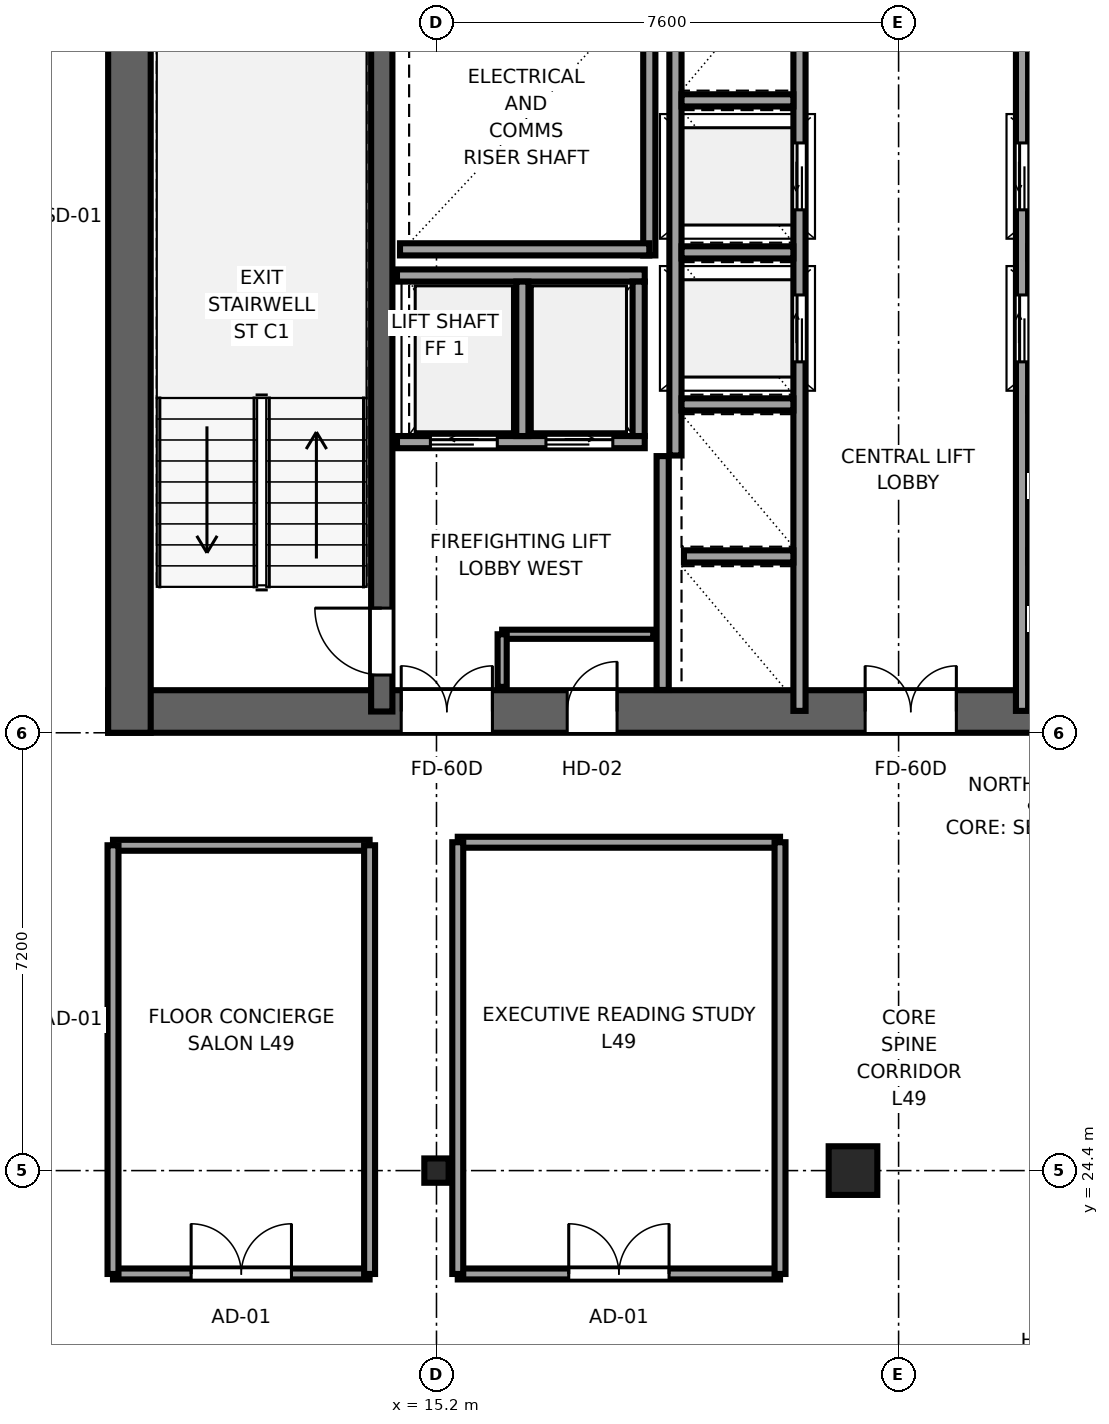
"""IFC4 building model, lengths in metres.
Left out: names, types, materials, properties, quantities, classifications, styles, units other than length and angle.
Written with IfcOpenShell. Run it as: python <this file> out.ifc"""

import sys

from ifc_helpers import new_model, si_unit, direction, frame, frame_2d, origin, origin_2d, place, context, subcontext, project, spatial, rectangle, i_section, extrude, source, transform, mapped, element, fill, save


model = new_model("IFC4")
c1 = context("Model", 3, precision=1e-05, world=origin(), true_north=direction((0.0, 1.0)))
c2 = subcontext(c1, "Body", "Model", "MODEL_VIEW")
j1 = project(units=[si_unit("LENGTHUNIT", "METRE"), si_unit("PLANEANGLEUNIT", "RADIAN")], contexts=[c1])
p1 = place(None, origin())
s1 = spatial("IfcSite", under=j1, at=p1, CompositionType="ELEMENT")
p2 = place(p1, origin())
s2 = spatial("IfcBuilding", under=s1, at=p2, CompositionType="ELEMENT")
p3 = place(p2, frame((0.0, 0.0, 187.55)))
s3 = spatial("IfcBuildingStorey", under=s2, at=p3, CompositionType="ELEMENT", Elevation=187.55)
p4 = place(p3, frame((9.8, 31.95, 0.0), z_axis=(0.0, 0.0, 1.0), x_axis=(1.0, 0.0, 0.0)))
e1 = element("IfcWall", 1, at=p4, inside=s3, PredefinedType="SHEAR", context=c2, shape_type="SweptSolid", body=[
    extrude(rectangle(XDim=26.4, YDim=0.7, at=frame_2d((13.2, 0.0))), origin(), (0.0, 0.0, 1.0), 3.55),
])
p5 = place(p4, frame((6.32, 0.0, 0.0), z_axis=(0.0, 0.0, 1.0), x_axis=(-1.0, 0.0, 0.0)))
e2 = element("IfcOpeningElement", 2, at=p5, cuts=e1, PredefinedType="OPENING", context=c2, shape_type="SweptSolid", body=[
    extrude(rectangle(XDim=1.5, YDim=2.04, at=frame_2d((0.75, 1.02))), frame((0.0, 0.36, 0.0), z_axis=(0.0, -1.0, 0.0), x_axis=(1.0, 0.0, 0.0)), (0.0, 0.0, 1.0), 0.72),
])
p6 = place(p4, frame((13.95, 0.0, 0.0), z_axis=(0.0, 0.0, 1.0), x_axis=(-1.0, 0.0, 0.0)))
e3 = element("IfcOpeningElement", 3, at=p6, cuts=e1, PredefinedType="OPENING", context=c2, shape_type="SweptSolid", body=[
    extrude(rectangle(XDim=1.5, YDim=2.04, at=frame_2d((0.75, 1.02))), frame((0.0, 0.36, 0.0), z_axis=(0.0, -1.0, 0.0), x_axis=(1.0, 0.0, 0.0)), (0.0, 0.0, 1.0), 0.72),
])
p7 = place(p4, frame((20.25, 0.0, 0.0), z_axis=(0.0, 0.0, 1.0), x_axis=(-1.0, 0.0, 0.0)))
e4 = element("IfcOpeningElement", 4, at=p7, cuts=e1, PredefinedType="OPENING", context=c2, shape_type="SweptSolid", body=[
    extrude(rectangle(XDim=1.5, YDim=2.04, at=frame_2d((0.75, 1.02))), frame((0.0, 0.36, 0.0), z_axis=(0.0, -1.0, 0.0), x_axis=(1.0, 0.0, 0.0)), (0.0, 0.0, 1.0), 0.72),
])
p8 = place(p4, frame((8.37, 0.0, 0.0), z_axis=(0.0, 0.0, 1.0), x_axis=(-1.0, 0.0, 0.0)))
e5 = element("IfcOpeningElement", 5, at=p8, cuts=e1, PredefinedType="OPENING", context=c2, shape_type="SweptSolid", body=[
    extrude(rectangle(XDim=0.82, YDim=2.01, at=frame_2d((0.41, 1.005))), frame((0.0, 0.36, 0.0), z_axis=(0.0, -1.0, 0.0), x_axis=(1.0, 0.0, 0.0)), (0.0, 0.0, 1.0), 0.72),
])
p9 = place(p3, frame((10.15, 31.6, 0.0), z_axis=(0.0, 0.0, 1.0), x_axis=(0.0, 1.0, 0.0)))
e6 = element("IfcWall", 6, at=p9, inside=s3, PredefinedType="SHEAR", context=c2, shape_type="SweptSolid", body=[
    extrude(rectangle(XDim=13.6, YDim=0.7, at=frame_2d((6.8, 0.0))), origin(), (0.0, 0.0, 1.0), 3.55),
])
p10 = place(p3, frame((14.3, 31.95, 0.0), z_axis=(0.0, 0.0, 1.0), x_axis=(0.0, 1.0, 0.0)))
e7 = element("IfcWall", 7, at=p10, inside=s3, PredefinedType="SHEAR", context=c2, shape_type="SweptSolid", body=[
    extrude(rectangle(XDim=12.9, YDim=0.35, at=frame_2d((6.45, 0.0))), origin(), (0.0, 0.0, 1.0), 3.55),
])
p11 = place(p10, frame((0.6, 0.0, 0.0)))
e8 = element("IfcOpeningElement", 8, at=p11, cuts=e7, PredefinedType="OPENING", context=c2, shape_type="SweptSolid", body=[
    extrude(rectangle(XDim=1.1, YDim=2.12, at=frame_2d((0.55, 1.06))), frame((0.0, 0.185, 0.0), z_axis=(0.0, -1.0, 0.0), x_axis=(1.0, 0.0, 0.0)), (0.0, 0.0, 1.0), 0.37),
])
m1 = source(origin(), c2, "Body", "SweptSolid", [
    extrude(i_section(OverallWidth=0.4, OverallDepth=0.4, WebThickness=0.02, FlangeThickness=0.035, at=origin_2d()), origin(), (0.0, 0.0, 1.0), 3.55),
])
p12 = place(p3, frame((15.2, 24.4, 0.0), z_axis=(0.0, 0.0, 1.0), x_axis=(1.0, 0.0, 0.0)))
e9 = element("IfcColumn", 9, at=p12, inside=s3, PredefinedType="COLUMN", context=c2, shape_type="MappedRepresentation", body=[
    mapped(m1, transform((0.0, 0.0, 0.0), x_axis=(1.0, 0.0, 0.0), y_axis=(0.0, 1.0, 0.0), z_axis=(0.0, 0.0, 1.0), scale=1.0)),
])
m2 = source(origin(), c2, "Body", "SweptSolid", [
    extrude(rectangle(XDim=0.8, YDim=0.8, at=origin_2d()), origin(), (0.0, 0.0, 1.0), 3.55),
])
p13 = place(p3, frame((22.05, 24.4, 0.0), z_axis=(0.0, 0.0, 1.0), x_axis=(1.0, 0.0, 0.0)))
e10 = element("IfcColumn", 10, at=p13, inside=s3, PredefinedType="COLUMN", context=c2, shape_type="MappedRepresentation", body=[
    mapped(m2, transform((0.0, 0.0, 0.0), x_axis=(1.0, 0.0, 0.0), y_axis=(0.0, 1.0, 0.0), z_axis=(0.0, 0.0, 1.0), scale=1.0)),
])
p14 = place(p3, frame((18.7, 39.45, 0.0), z_axis=(0.0, 0.0, 1.0), x_axis=(0.0, 1.0, 0.0)))
e11 = element("IfcWall", 11, at=p14, inside=s3, PredefinedType="SOLIDWALL", context=c2, shape_type="SweptSolid", body=[
    extrude(rectangle(XDim=4.4, YDim=0.2, at=frame_2d((2.2, 0.0))), origin(), (0.0, 0.0, 1.0), 3.37),
])
p15 = place(p3, frame((14.6, 39.55, 0.0), z_axis=(0.0, 0.0, 1.0), x_axis=(1.0, 0.0, 0.0)))
e12 = element("IfcWall", 12, at=p15, inside=s3, PredefinedType="SOLIDWALL", context=c2, shape_type="SweptSolid", body=[
    extrude(rectangle(XDim=4.1, YDim=0.2, at=frame_2d((2.05, 0.0))), origin(), (0.0, 0.0, 1.0), 3.37),
])
p16 = place(p3, frame((18.92, 32.304, 0.0), z_axis=(0.0, 0.0, 1.0), x_axis=(0.0, 1.0, 0.0)))
e13 = element("IfcWall", 13, at=p16, inside=s3, PredefinedType="SOLIDWALL", context=c2, shape_type="SweptSolid", body=[
    extrude(rectangle(XDim=3.846, YDim=0.2, at=frame_2d((1.923, 0.0))), origin(), (0.0, 0.0, 1.0), 3.37),
])
p17 = place(p3, frame((21.17, 31.96, 0.0), z_axis=(0.0, 0.0, 1.0), x_axis=(0.0, 1.0, 0.0)))
e14 = element("IfcWall", 14, at=p17, inside=s3, PredefinedType="SOLIDWALL", context=c2, shape_type="SweptSolid", body=[
    extrude(rectangle(XDim=12.58, YDim=0.2, at=frame_2d((6.29, 0.0))), origin(), (0.0, 0.0, 1.0), 3.37),
])
p18 = place(p17, frame((5.74, 0.0, 0.0)))
e15 = element("IfcOpeningElement", 15, at=p18, cuts=e14, PredefinedType="OPENING", context=c2, shape_type="SweptSolid", body=[
    extrude(rectangle(XDim=1.1, YDim=2.12, at=frame_2d((0.55, 1.06))), frame((0.0, 0.11, 0.0), z_axis=(0.0, -1.0, 0.0), x_axis=(1.0, 0.0, 0.0)), (0.0, 0.0, 1.0), 0.22),
])
p19 = place(p17, frame((8.24, 0.0, 0.0)))
e16 = element("IfcOpeningElement", 16, at=p19, cuts=e14, PredefinedType="OPENING", context=c2, shape_type="SweptSolid", body=[
    extrude(rectangle(XDim=1.1, YDim=2.12, at=frame_2d((0.55, 1.06))), frame((0.0, 0.11, 0.0), z_axis=(0.0, -1.0, 0.0), x_axis=(1.0, 0.0, 0.0)), (0.0, 0.0, 1.0), 0.22),
])
p20 = place(p3, frame((19.13, 36.16, 0.0), z_axis=(0.0, 0.0, 1.0), x_axis=(0.0, 1.0, 0.0)))
e17 = element("IfcWall", 17, at=p20, inside=s3, PredefinedType="SOLIDWALL", context=c2, shape_type="SweptSolid", body=[
    extrude(rectangle(XDim=8.336, YDim=0.2, at=frame_2d((4.168, 0.0))), origin(), (0.0, 0.0, 1.0), 3.37),
])
p21 = place(p3, frame((19.27, 34.5, 0.0), z_axis=(0.0, 0.0, 1.0), x_axis=(1.0, 0.0, 0.0)))
e18 = element("IfcWall", 18, at=p21, inside=s3, PredefinedType="SOLIDWALL", context=c2, shape_type="SweptSolid", body=[
    extrude(rectangle(XDim=1.8, YDim=0.2, at=frame_2d((0.9, 0.0))), origin(), (0.0, 0.0, 1.0), 3.37),
])
for number, where, z_axis, x_axis in (
    (19, (19.23, 37.0, 0.0), (0.0, 0.0, 1.0), (1.0, 0.0, 0.0)),
    (20, (19.23, 39.5, 0.0), (0.0, 0.0, 1.0), (1.0, 0.0, 0.0)),
    (21, (19.23, 42.0, 0.0), (0.0, 0.0, 1.0), (1.0, 0.0, 0.0)),
):
    element("IfcWall", number, at=place(p3, frame(where, z_axis=z_axis, x_axis=x_axis)), inside=s3, PredefinedType="SOLIDWALL", context=c2, shape_type="SweptSolid", body=[
        extrude(rectangle(XDim=1.84, YDim=0.2, at=frame_2d((0.92, 0.0))), origin(), (0.0, 0.0, 1.0), 3.37),
    ])
p22 = place(p3, frame((14.55, 36.38, 0.0), z_axis=(0.0, 0.0, 1.0), x_axis=(1.0, 0.0, 0.0)))
e22 = element("IfcWall", 22, at=p22, inside=s3, PredefinedType="SOLIDWALL", context=c2, shape_type="SweptSolid", body=[
    extrude(rectangle(XDim=4.075, YDim=0.2, at=frame_2d((2.038, 0.0))), origin(), (0.0, 0.0, 1.0), 3.37),
])
p23 = place(p22, frame((0.55, 0.0, 0.0)))
e23 = element("IfcOpeningElement", 23, at=p23, cuts=e22, PredefinedType="OPENING", context=c2, shape_type="SweptSolid", body=[
    extrude(rectangle(XDim=1.1, YDim=2.12, at=frame_2d((0.55, 1.06))), frame((0.0, 0.11, 0.0), z_axis=(0.0, -1.0, 0.0), x_axis=(1.0, 0.0, 0.0)), (0.0, 0.0, 1.0), 0.22),
])
p24 = place(p22, frame((2.45, 0.0, 0.0)))
e24 = element("IfcOpeningElement", 24, at=p24, cuts=e22, PredefinedType="OPENING", context=c2, shape_type="SweptSolid", body=[
    extrude(rectangle(XDim=1.1, YDim=2.12, at=frame_2d((0.55, 1.06))), frame((0.0, 0.11, 0.0), z_axis=(0.0, -1.0, 0.0), x_axis=(1.0, 0.0, 0.0)), (0.0, 0.0, 1.0), 0.22),
])
p25 = place(p3, frame((14.55, 39.12, 0.0), z_axis=(0.0, 0.0, 1.0), x_axis=(1.0, 0.0, 0.0)))
e25 = element("IfcWall", 25, at=p25, inside=s3, PredefinedType="SOLIDWALL", context=c2, shape_type="SweptSolid", body=[
    extrude(rectangle(XDim=4.075, YDim=0.2, at=frame_2d((2.038, 0.0))), origin(), (0.0, 0.0, 1.0), 3.37),
])
for number, where, z_axis, x_axis in (
    (26, (18.525, 36.48, 0.0), (0.0, 0.0, 1.0), (0.0, 1.0, 0.0)),
    (27, (16.613, 36.48, 0.0), (0.0, 0.0, 1.0), (0.0, 1.0, 0.0)),
):
    element("IfcWall", number, at=place(p3, frame(where, z_axis=z_axis, x_axis=x_axis)), inside=s3, PredefinedType="SOLIDWALL", context=c2, shape_type="SweptSolid", body=[
        extrude(rectangle(XDim=2.54, YDim=0.2, at=frame_2d((1.27, 0.0))), origin(), (0.0, 0.0, 1.0), 3.37),
    ])
p26 = place(p3, frame((24.83, 31.96, 0.0), z_axis=(0.0, 0.0, 1.0), x_axis=(0.0, 1.0, 0.0)))
e28 = element("IfcWall", 28, at=p26, inside=s3, PredefinedType="SOLIDWALL", context=c2, shape_type="SweptSolid", body=[
    extrude(rectangle(XDim=12.58, YDim=0.2, at=frame_2d((6.29, 0.0))), origin(), (0.0, 0.0, 1.0), 3.37),
])
p27 = place(p26, frame((5.74, 0.0, 0.0)))
e29 = element("IfcOpeningElement", 29, at=p27, cuts=e28, PredefinedType="OPENING", context=c2, shape_type="SweptSolid", body=[
    extrude(rectangle(XDim=1.1, YDim=2.12, at=frame_2d((0.55, 1.06))), frame((0.0, 0.11, 0.0), z_axis=(0.0, -1.0, 0.0), x_axis=(1.0, 0.0, 0.0)), (0.0, 0.0, 1.0), 0.22),
])
p28 = place(p26, frame((8.24, 0.0, 0.0)))
e30 = element("IfcOpeningElement", 30, at=p28, cuts=e28, PredefinedType="OPENING", context=c2, shape_type="SweptSolid", body=[
    extrude(rectangle(XDim=1.1, YDim=2.12, at=frame_2d((0.55, 1.06))), frame((0.0, 0.11, 0.0), z_axis=(0.0, -1.0, 0.0), x_axis=(1.0, 0.0, 0.0)), (0.0, 0.0, 1.0), 0.22),
])
p29 = place(p3, frame((24.93, 34.5, 0.0), z_axis=(0.0, 0.0, 1.0), x_axis=(1.0, 0.0, 0.0)))
e31 = element("IfcWall", 31, at=p29, inside=s3, PredefinedType="SOLIDWALL", context=c2, shape_type="SweptSolid", body=[
    extrude(rectangle(XDim=1.8, YDim=0.2, at=frame_2d((0.9, 0.0))), origin(), (0.0, 0.0, 1.0), 3.37),
])
for number, where, z_axis, x_axis in (
    (32, (24.93, 37.0, 0.0), (0.0, 0.0, 1.0), (1.0, 0.0, 0.0)),
    (33, (24.93, 39.5, 0.0), (0.0, 0.0, 1.0), (1.0, 0.0, 0.0)),
    (34, (24.93, 42.0, 0.0), (0.0, 0.0, 1.0), (1.0, 0.0, 0.0)),
):
    element("IfcWall", number, at=place(p3, frame(where, z_axis=z_axis, x_axis=x_axis)), inside=s3, PredefinedType="SOLIDWALL", context=c2, shape_type="SweptSolid", body=[
        extrude(rectangle(XDim=1.84, YDim=0.2, at=frame_2d((0.92, 0.0))), origin(), (0.0, 0.0, 1.0), 3.37),
    ])
p30 = place(p3, frame((16.28, 33.22, 0.0), z_axis=(0.0, 0.0, 1.0), x_axis=(1.0, 0.0, 0.0)))
e35 = element("IfcWall", 35, at=p30, inside=s3, PredefinedType="PARTITIONING", context=c2, shape_type="SweptSolid", body=[
    extrude(rectangle(XDim=2.485, YDim=0.15, at=frame_2d((1.242, 0.0))), origin(), (0.0, 0.0, 1.0), 3.37),
])
p31 = place(p3, frame((16.28, 32.355, 0.0), z_axis=(0.0, 0.0, 1.0), x_axis=(0.0, 1.0, 0.0)))
e36 = element("IfcWall", 36, at=p31, inside=s3, PredefinedType="PARTITIONING", context=c2, shape_type="SweptSolid", body=[
    extrude(rectangle(XDim=0.865, YDim=0.15, at=frame_2d((0.433, 0.0))), origin(), (0.0, 0.0, 1.0), 3.37),
])
p32 = place(p3, frame((9.88, 22.7, 0.0), z_axis=(0.0, 0.0, 1.0), x_axis=(1.0, 0.0, 0.0)))
e37 = element("IfcWall", 37, at=p32, inside=s3, PredefinedType="PARTITIONING", context=c2, shape_type="SweptSolid", body=[
    extrude(rectangle(XDim=4.22, YDim=0.18, at=frame_2d((2.11, 0.0))), origin(), (0.0, 0.0, 1.0), 3.37),
])
p33 = place(p32, frame((1.285, 0.0, 0.0)))
e38 = element("IfcOpeningElement", 38, at=p33, cuts=e37, PredefinedType="OPENING", context=c2, shape_type="SweptSolid", body=[
    extrude(rectangle(XDim=1.65, YDim=2.15, at=frame_2d((0.825, 1.075))), frame((0.0, 0.1, 0.0), z_axis=(0.0, -1.0, 0.0), x_axis=(1.0, 0.0, 0.0)), (0.0, 0.0, 1.0), 0.2),
])
p34 = place(p3, frame((9.88, 29.75, 0.0), z_axis=(0.0, 0.0, 1.0), x_axis=(1.0, 0.0, 0.0)))
e39 = element("IfcWall", 39, at=p34, inside=s3, PredefinedType="PARTITIONING", context=c2, shape_type="SweptSolid", body=[
    extrude(rectangle(XDim=4.22, YDim=0.18, at=frame_2d((2.11, 0.0))), origin(), (0.0, 0.0, 1.0), 3.37),
])
for number, where, z_axis, x_axis in (
    (40, (9.88, 22.7, 0.0), (0.0, 0.0, 1.0), (0.0, 1.0, 0.0)),
    (41, (14.1, 22.7, 0.0), (0.0, 0.0, 1.0), (0.0, 1.0, 0.0)),
):
    element("IfcWall", number, at=place(p3, frame(where, z_axis=z_axis, x_axis=x_axis)), inside=s3, PredefinedType="PARTITIONING", context=c2, shape_type="SweptSolid", body=[
        extrude(rectangle(XDim=7.05, YDim=0.18, at=frame_2d((3.525, 0.0))), origin(), (0.0, 0.0, 1.0), 3.37),
    ])
p35 = place(p3, frame((15.55, 22.7, 0.0), z_axis=(0.0, 0.0, 1.0), x_axis=(1.0, 0.0, 0.0)))
e42 = element("IfcWall", 42, at=p35, inside=s3, PredefinedType="PARTITIONING", context=c2, shape_type="SweptSolid", body=[
    extrude(rectangle(XDim=5.3, YDim=0.18, at=frame_2d((2.65, 0.0))), origin(), (0.0, 0.0, 1.0), 3.37),
])
p36 = place(p35, frame((1.825, 0.0, 0.0)))
e43 = element("IfcOpeningElement", 43, at=p36, cuts=e42, PredefinedType="OPENING", context=c2, shape_type="SweptSolid", body=[
    extrude(rectangle(XDim=1.65, YDim=2.15, at=frame_2d((0.825, 1.075))), frame((0.0, 0.1, 0.0), z_axis=(0.0, -1.0, 0.0), x_axis=(1.0, 0.0, 0.0)), (0.0, 0.0, 1.0), 0.2),
])
p37 = place(p3, frame((15.55, 29.8, 0.0), z_axis=(0.0, 0.0, 1.0), x_axis=(1.0, 0.0, 0.0)))
e44 = element("IfcWall", 44, at=p37, inside=s3, PredefinedType="PARTITIONING", context=c2, shape_type="SweptSolid", body=[
    extrude(rectangle(XDim=5.3, YDim=0.18, at=frame_2d((2.65, 0.0))), origin(), (0.0, 0.0, 1.0), 3.37),
])
for number, where, z_axis, x_axis in (
    (45, (15.55, 22.7, 0.0), (0.0, 0.0, 1.0), (0.0, 1.0, 0.0)),
    (46, (20.85, 22.7, 0.0), (0.0, 0.0, 1.0), (0.0, 1.0, 0.0)),
):
    element("IfcWall", number, at=place(p3, frame(where, z_axis=z_axis, x_axis=x_axis)), inside=s3, PredefinedType="PARTITIONING", context=c2, shape_type="SweptSolid", body=[
        extrude(rectangle(XDim=7.1, YDim=0.18, at=frame_2d((3.55, 0.0))), origin(), (0.0, 0.0, 1.0), 3.37),
    ])
m3 = source(origin(), c2, "Body", "SweptSolid", [
    extrude(rectangle(XDim=1.1, YDim=2.12, at=frame_2d((0.55, 1.06))), frame((0.0, 0.025, 0.0), z_axis=(0.0, -1.0, 0.0), x_axis=(1.0, 0.0, 0.0)), (0.0, 0.0, 1.0), 0.05),
])
p38 = place(p11, origin())
e47 = element("IfcDoor", 47, at=p38, inside=s3, OperationType="SINGLE_SWING_RIGHT", PredefinedType="DOOR", context=c2, shape_type="MappedRepresentation", body=[
    mapped(m3, transform((0.0, 0.0, 0.0), x_axis=(1.0, 0.0, 0.0), y_axis=(0.0, 1.0, 0.0), z_axis=(0.0, 0.0, 1.0), scale=1.0)),
])
fill(e8, e47)
m4 = source(origin(), c2, "Body", "SweptSolid", [
    extrude(rectangle(XDim=1.5, YDim=2.04, at=frame_2d((0.75, 1.02))), frame((0.0, 0.025, 0.0), z_axis=(0.0, -1.0, 0.0), x_axis=(1.0, 0.0, 0.0)), (0.0, 0.0, 1.0), 0.05),
])
p39 = place(p5, origin())
e48 = element("IfcDoor", 48, at=p39, inside=s3, OperationType="DOUBLE_DOOR_SINGLE_SWING", PredefinedType="DOOR", context=c2, shape_type="MappedRepresentation", body=[
    mapped(m4, transform((0.0, 0.0, 0.0), x_axis=(1.0, 0.0, 0.0), y_axis=(0.0, 1.0, 0.0), z_axis=(0.0, 0.0, 1.0), scale=1.0)),
])
fill(e2, e48)
p40 = place(p6, origin())
e49 = element("IfcDoor", 49, at=p40, inside=s3, OperationType="DOUBLE_DOOR_SINGLE_SWING", PredefinedType="DOOR", context=c2, shape_type="MappedRepresentation", body=[
    mapped(m4, transform((0.0, 0.0, 0.0), x_axis=(1.0, 0.0, 0.0), y_axis=(0.0, 1.0, 0.0), z_axis=(0.0, 0.0, 1.0), scale=1.0)),
])
fill(e3, e49)
m5 = source(origin(), c2, "Body", "SweptSolid", [
    extrude(rectangle(XDim=0.82, YDim=2.01, at=frame_2d((0.41, 1.005))), frame((0.0, 0.025, 0.0), z_axis=(0.0, -1.0, 0.0), x_axis=(1.0, 0.0, 0.0)), (0.0, 0.0, 1.0), 0.05),
])
p41 = place(p8, origin())
e50 = element("IfcDoor", 50, at=p41, inside=s3, OperationType="SINGLE_SWING_RIGHT", PredefinedType="DOOR", context=c2, shape_type="MappedRepresentation", body=[
    mapped(m5, transform((0.0, 0.0, 0.0), x_axis=(1.0, 0.0, 0.0), y_axis=(0.0, 1.0, 0.0), z_axis=(0.0, 0.0, 1.0), scale=1.0)),
])
fill(e5, e50)
m6 = source(origin(), c2, "Body", "SweptSolid", [
    extrude(rectangle(XDim=1.1, YDim=2.12, at=frame_2d((0.55, 1.06))), frame((0.0, 0.025, 0.0), z_axis=(0.0, -1.0, 0.0), x_axis=(1.0, 0.0, 0.0)), (0.0, 0.0, 1.0), 0.05),
])
p42 = place(p18, origin())
e51 = element("IfcDoor", 51, at=p42, inside=s3, OperationType="SLIDING_TO_RIGHT", PredefinedType="DOOR", context=c2, shape_type="MappedRepresentation", body=[
    mapped(m6, transform((0.0, 0.0, 0.0), x_axis=(1.0, 0.0, 0.0), y_axis=(0.0, 1.0, 0.0), z_axis=(0.0, 0.0, 1.0), scale=1.0)),
])
fill(e15, e51)
p43 = place(p19, origin())
e52 = element("IfcDoor", 52, at=p43, inside=s3, OperationType="SLIDING_TO_LEFT", PredefinedType="DOOR", context=c2, shape_type="MappedRepresentation", body=[
    mapped(m6, transform((0.0, 0.0, 0.0), x_axis=(1.0, 0.0, 0.0), y_axis=(0.0, 1.0, 0.0), z_axis=(0.0, 0.0, 1.0), scale=1.0)),
])
fill(e16, e52)
p44 = place(p23, origin())
e53 = element("IfcDoor", 53, at=p44, inside=s3, OperationType="SLIDING_TO_LEFT", PredefinedType="DOOR", context=c2, shape_type="MappedRepresentation", body=[
    mapped(m6, transform((0.0, 0.0, 0.0), x_axis=(1.0, 0.0, 0.0), y_axis=(0.0, 1.0, 0.0), z_axis=(0.0, 0.0, 1.0), scale=1.0)),
])
fill(e23, e53)
p45 = place(p24, origin())
e54 = element("IfcDoor", 54, at=p45, inside=s3, OperationType="SLIDING_TO_RIGHT", PredefinedType="DOOR", context=c2, shape_type="MappedRepresentation", body=[
    mapped(m6, transform((0.0, 0.0, 0.0), x_axis=(1.0, 0.0, 0.0), y_axis=(0.0, 1.0, 0.0), z_axis=(0.0, 0.0, 1.0), scale=1.0)),
])
fill(e24, e54)
p46 = place(p27, origin())
e55 = element("IfcDoor", 55, at=p46, inside=s3, OperationType="SLIDING_TO_RIGHT", PredefinedType="DOOR", context=c2, shape_type="MappedRepresentation", body=[
    mapped(m6, transform((0.0, 0.0, 0.0), x_axis=(1.0, 0.0, 0.0), y_axis=(0.0, 1.0, 0.0), z_axis=(0.0, 0.0, 1.0), scale=1.0)),
])
fill(e29, e55)
p47 = place(p28, origin())
e56 = element("IfcDoor", 56, at=p47, inside=s3, OperationType="SLIDING_TO_LEFT", PredefinedType="DOOR", context=c2, shape_type="MappedRepresentation", body=[
    mapped(m6, transform((0.0, 0.0, 0.0), x_axis=(1.0, 0.0, 0.0), y_axis=(0.0, 1.0, 0.0), z_axis=(0.0, 0.0, 1.0), scale=1.0)),
])
fill(e30, e56)
m7 = source(origin(), c2, "Body", "SweptSolid", [
    extrude(rectangle(XDim=1.65, YDim=2.15, at=frame_2d((0.825, 1.075))), frame((0.0, 0.025, 0.0), z_axis=(0.0, -1.0, 0.0), x_axis=(1.0, 0.0, 0.0)), (0.0, 0.0, 1.0), 0.05),
])
p48 = place(p33, origin())
e57 = element("IfcDoor", 57, at=p48, inside=s3, OperationType="DOUBLE_DOOR_SINGLE_SWING", PredefinedType="DOOR", context=c2, shape_type="MappedRepresentation", body=[
    mapped(m7, transform((0.0, 0.0, 0.0), x_axis=(1.0, 0.0, 0.0), y_axis=(0.0, 1.0, 0.0), z_axis=(0.0, 0.0, 1.0), scale=1.0)),
])
fill(e38, e57)
p49 = place(p36, origin())
e58 = element("IfcDoor", 58, at=p49, inside=s3, OperationType="DOUBLE_DOOR_SINGLE_SWING", PredefinedType="DOOR", context=c2, shape_type="MappedRepresentation", body=[
    mapped(m7, transform((0.0, 0.0, 0.0), x_axis=(1.0, 0.0, 0.0), y_axis=(0.0, 1.0, 0.0), z_axis=(0.0, 0.0, 1.0), scale=1.0)),
])
fill(e43, e58)
save(model, sys.argv[1])
